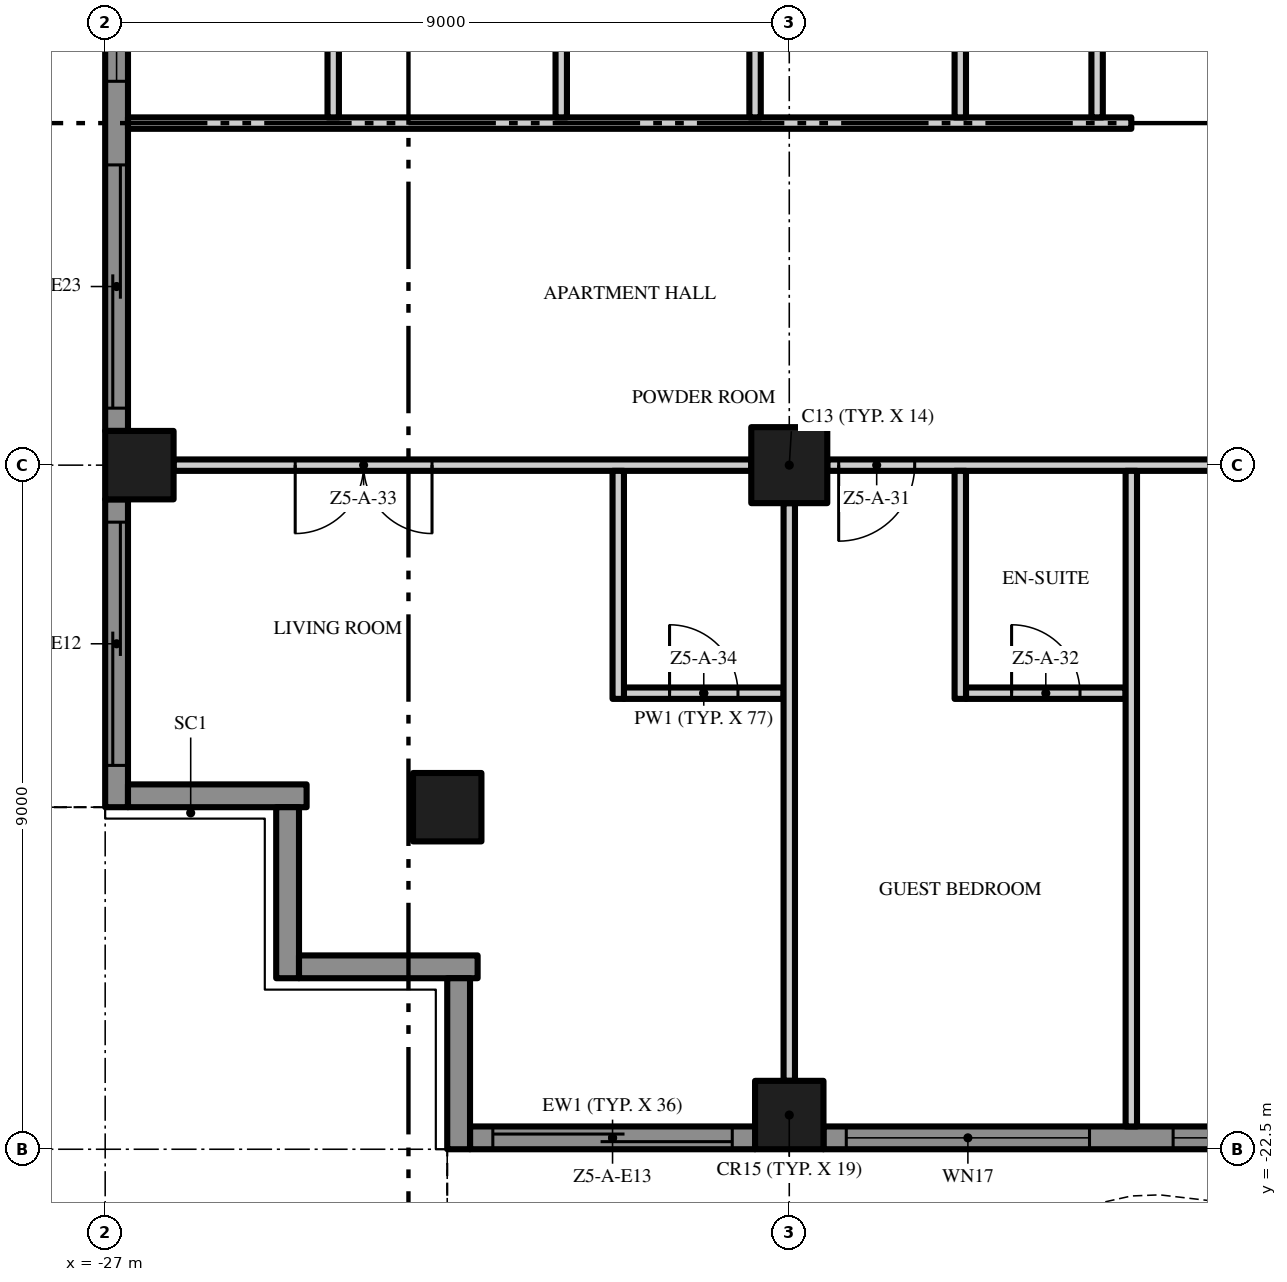
"""IFC4 building model, lengths in metres.
Left out: names, types, materials, properties, quantities, classifications, styles, units other than length and angle.
Written with IfcOpenShell. Run it as: python <this file> out.ifc"""

import sys

from ifc_helpers import new_model, si_unit, direction, frame, frame_2d, origin, origin_2d, place, context, subcontext, project, spatial, polyline, rectangle, outline, extrude, element, fill, save


model = new_model("IFC4")
c1 = context("Model", 3, precision=1e-05, world=origin(), true_north=direction((0.0, 1.0)))
c2 = subcontext(c1, "Body", "Model", "MODEL_VIEW")
j1 = project(units=[si_unit("LENGTHUNIT", "METRE"), si_unit("PLANEANGLEUNIT", "RADIAN")], contexts=[c1])
p1 = place(None, origin())
s1 = spatial("IfcSite", under=j1, at=p1, CompositionType="ELEMENT")
p2 = place(p1, origin())
s2 = spatial("IfcBuilding", under=s1, at=p2, CompositionType="ELEMENT")
p3 = place(p2, frame((0.0, 0.0, 246.4)))
s3 = spatial("IfcBuildingStorey", under=s2, at=p3, CompositionType="ELEMENT", Elevation=246.4)
p4 = place(p3, frame((-18.0, -13.5, 0.0), z_axis=(0.0, 0.0, 1.0), x_axis=(1.0, 0.0, 0.0)))
e1 = element("IfcColumn", 1, at=p4, inside=s3, PredefinedType="COLUMN", context=c2, shape_type="SweptSolid", body=[
    extrude(rectangle(XDim=1.0, YDim=1.0, at=origin_2d()), origin(), (0.0, 0.0, 1.0), 3.5),
])
for number, where, z_axis, x_axis in (
    (2, (-18.0, -22.05, 0.0), (0.0, 0.0, 1.0), (1.0, 0.0, 0.0)),
    (3, (-26.55, -13.5, 0.0), (0.0, 0.0, 1.0), (1.0, 0.0, 0.0)),
    (4, (-22.5, -18.0, 0.0), (0.0, 0.0, 1.0), (1.0, 0.0, 0.0)),
):
    element("IfcColumn", number, at=place(p3, frame(where, z_axis=z_axis, x_axis=x_axis)), inside=s3, PredefinedType="COLUMN", context=c2, shape_type="SweptSolid", body=[
        extrude(rectangle(XDim=0.9, YDim=0.9, at=origin_2d()), origin(), (0.0, 0.0, 1.0), 3.5),
    ])
p5 = place(p3, frame((-18.45, -22.35, 0.0), z_axis=(0.0, 0.0, 1.0), x_axis=(-1.0, 0.0, 0.0)))
e5 = element("IfcWall", 5, at=p5, inside=s3, PredefinedType="SOLIDWALL", context=c2, shape_type="SweptSolid", body=[
    extrude(rectangle(XDim=3.75, YDim=0.3, at=frame_2d((1.875, 0.0))), origin(), (0.0, 0.0, 1.0), 3.5),
])
p6 = place(p5, frame((0.3, 0.0, 0.0)))
e6 = element("IfcOpeningElement", 6, at=p6, cuts=e5, PredefinedType="OPENING", context=c2, shape_type="SweptSolid", body=[
    extrude(rectangle(XDim=3.15, YDim=2.4, at=frame_2d((1.575, 1.2))), frame((0.0, 0.16, 0.0), z_axis=(0.0, -1.0, 0.0), x_axis=(1.0, 0.0, 0.0)), (0.0, 0.0, 1.0), 0.32),
])
p7 = place(p3, frame((-9.45, -22.35, 0.0), z_axis=(0.0, 0.0, 1.0), x_axis=(-1.0, 0.0, 0.0)))
e7 = element("IfcWall", 7, at=p7, inside=s3, PredefinedType="SOLIDWALL", context=c2, shape_type="SweptSolid", body=[
    extrude(rectangle(XDim=8.1, YDim=0.3, at=frame_2d((4.05, 0.0))), origin(), (0.0, 0.0, 1.0), 3.5),
])
p8 = place(p7, frame((4.6, 0.0, 0.45)))
e8 = element("IfcOpeningElement", 8, at=p8, cuts=e7, PredefinedType="OPENING", context=c2, shape_type="SweptSolid", body=[
    extrude(rectangle(XDim=3.2, YDim=2.65, at=frame_2d((1.6, 1.325))), frame((0.0, 0.16, 0.0), z_axis=(0.0, -1.0, 0.0), x_axis=(1.0, 0.0, 0.0)), (0.0, 0.0, 1.0), 0.32),
])
p9 = place(p7, frame((0.3, 0.0, 0.45)))
e9 = element("IfcOpeningElement", 9, at=p9, cuts=e7, PredefinedType="OPENING", context=c2, shape_type="SweptSolid", body=[
    extrude(rectangle(XDim=3.2, YDim=2.65, at=frame_2d((1.6, 1.325))), frame((0.0, 0.16, 0.0), z_axis=(0.0, -1.0, 0.0), x_axis=(1.0, 0.0, 0.0)), (0.0, 0.0, 1.0), 0.32),
])
p10 = place(p3, frame((-26.85, -13.05, 0.0), z_axis=(0.0, 0.0, 1.0), x_axis=(0.0, 1.0, 0.0)))
e10 = element("IfcWall", 10, at=p10, inside=s3, PredefinedType="SOLIDWALL", context=c2, shape_type="SweptSolid", body=[
    extrude(rectangle(XDim=8.1, YDim=0.3, at=frame_2d((4.05, 0.0))), origin(), (0.0, 0.0, 1.0), 3.5),
])
p11 = place(p10, frame((4.6, 0.0, 0.45)))
e11 = element("IfcOpeningElement", 11, at=p11, cuts=e10, PredefinedType="OPENING", context=c2, shape_type="SweptSolid", body=[
    extrude(rectangle(XDim=3.2, YDim=2.65, at=frame_2d((1.6, 1.325))), frame((0.0, 0.16, 0.0), z_axis=(0.0, -1.0, 0.0), x_axis=(1.0, 0.0, 0.0)), (0.0, 0.0, 1.0), 0.32),
])
p12 = place(p10, frame((0.3, 0.0, 0.0)))
e12 = element("IfcOpeningElement", 12, at=p12, cuts=e10, PredefinedType="OPENING", context=c2, shape_type="SweptSolid", body=[
    extrude(rectangle(XDim=3.2, YDim=2.4, at=frame_2d((1.6, 1.2))), frame((0.0, 0.16, 0.0), z_axis=(0.0, -1.0, 0.0), x_axis=(1.0, 0.0, 0.0)), (0.0, 0.0, 1.0), 0.32),
])
p13 = place(p3, frame((-26.85, -18.0, 0.0), z_axis=(0.0, 0.0, 1.0), x_axis=(0.0, 1.0, 0.0)))
e13 = element("IfcWall", 13, at=p13, inside=s3, PredefinedType="SOLIDWALL", context=c2, shape_type="SweptSolid", body=[
    extrude(rectangle(XDim=4.05, YDim=0.3, at=frame_2d((2.025, 0.0))), origin(), (0.0, 0.0, 1.0), 3.5),
])
p14 = place(p13, frame((0.55, 0.0, 0.0)))
e14 = element("IfcOpeningElement", 14, at=p14, cuts=e13, PredefinedType="OPENING", context=c2, shape_type="SweptSolid", body=[
    extrude(rectangle(XDim=3.2, YDim=2.4, at=frame_2d((1.6, 1.2))), frame((0.0, 0.16, 0.0), z_axis=(0.0, -1.0, 0.0), x_axis=(1.0, 0.0, 0.0)), (0.0, 0.0, 1.0), 0.32),
])
p15 = place(p3, frame((-24.35, -17.85, 0.0), z_axis=(0.0, 0.0, 1.0), x_axis=(-1.0, 0.0, 0.0)))
e15 = element("IfcWall", 15, at=p15, inside=s3, PredefinedType="SOLIDWALL", context=c2, shape_type="SweptSolid", body=[
    extrude(rectangle(XDim=2.35, YDim=0.3, at=frame_2d((1.175, 0.0))), origin(), (0.0, 0.0, 1.0), 3.5),
])
p16 = place(p3, frame((-24.6, -20.25, 0.0), z_axis=(0.0, 0.0, 1.0), x_axis=(0.0, 1.0, 0.0)))
e16 = element("IfcWall", 16, at=p16, inside=s3, PredefinedType="SOLIDWALL", context=c2, shape_type="SweptSolid", body=[
    extrude(rectangle(XDim=2.25, YDim=0.3, at=frame_2d((1.125, 0.0))), origin(), (0.0, 0.0, 1.0), 3.5),
])
p17 = place(p3, frame((-22.1, -20.1, 0.0), z_axis=(0.0, 0.0, 1.0), x_axis=(-1.0, 0.0, 0.0)))
e17 = element("IfcWall", 17, at=p17, inside=s3, PredefinedType="SOLIDWALL", context=c2, shape_type="SweptSolid", body=[
    extrude(rectangle(XDim=2.35, YDim=0.3, at=frame_2d((1.175, 0.0))), origin(), (0.0, 0.0, 1.0), 3.5),
])
p18 = place(p3, frame((-22.35, -22.5, 0.0), z_axis=(0.0, 0.0, 1.0), x_axis=(0.0, 1.0, 0.0)))
e18 = element("IfcWall", 18, at=p18, inside=s3, PredefinedType="SOLIDWALL", context=c2, shape_type="SweptSolid", body=[
    extrude(rectangle(XDim=2.25, YDim=0.3, at=frame_2d((1.125, 0.0))), origin(), (0.0, 0.0, 1.0), 3.5),
])
p19 = place(p3, origin())
e19 = element("IfcWall", 19, at=p19, inside=s3, PredefinedType="USERDEFINED", context=c2, shape_type="SweptSolid", body=[
    extrude(outline(polyline([(-22.5, -25.149), (-21.0, -25.485), (-20.625, -25.5), (-19.5, -25.369), (-18.0, -24.845), (-16.5, -24.112), (-15.0, -23.451), (-13.5, -23.115), (-13.125, -23.1), (-12.0, -23.231), (-10.5, -23.755), (-9.0, -24.488), (-7.5, -25.149), (-6.0, -25.485), (-5.625, -25.5), (-4.5, -25.369), (-3.0, -24.845), (-1.5, -24.112), (0.0, -23.451), (1.5, -23.115), (1.875, -23.1), (3.0, -23.231), (4.5, -23.755), (6.0, -24.488), (7.5, -25.149), (9.0, -25.485), (9.375, -25.5), (10.5, -25.369), (12.0, -24.845), (13.5, -24.112), (15.0, -23.451), (16.5, -23.115), (16.875, -23.1), (18.0, -23.231), (19.5, -23.755), (21.0, -24.488), (22.5, -25.149), (22.601, -24.92), (21.105, -24.261), (19.596, -23.524), (18.056, -22.986), (16.885, -22.849), (16.467, -22.866), (14.921, -23.213), (13.395, -23.885), (11.904, -24.614), (10.444, -25.124), (9.365, -25.249), (9.033, -25.236), (7.579, -24.91), (6.105, -24.261), (4.596, -23.524), (3.056, -22.986), (1.885, -22.849), (1.467, -22.866), (-0.079, -23.213), (-1.605, -23.885), (-3.096, -24.614), (-4.556, -25.124), (-5.635, -25.249), (-5.967, -25.236), (-7.421, -24.91), (-8.895, -24.261), (-10.404, -23.524), (-11.944, -22.986), (-13.115, -22.849), (-13.533, -22.866), (-15.079, -23.213), (-16.605, -23.885), (-18.096, -24.614), (-19.556, -25.124), (-20.635, -25.249), (-20.967, -25.236), (-22.445, -24.905), (-22.5, -25.149)])), origin(), (0.0, 0.0, 1.0), 0.9),
])
p20 = place(p3, origin())
e20 = element("IfcWall", 20, at=p20, inside=s3, PredefinedType="USERDEFINED", context=c2, shape_type="SweptSolid", body=[
    extrude(outline(polyline([(-29.649, 18.0), (-29.985, 16.5), (-30.0, 16.125), (-29.869, 15.0), (-29.345, 13.5), (-28.612, 12.0), (-27.951, 10.5), (-27.615, 9.0), (-27.6, 8.625), (-27.731, 7.5), (-28.255, 6.0), (-28.988, 4.5), (-29.649, 3.0), (-29.985, 1.5), (-30.0, 1.125), (-29.869, 0.0), (-29.345, -1.5), (-28.612, -3.0), (-27.951, -4.5), (-27.615, -6.0), (-27.6, -6.375), (-27.731, -7.5), (-28.255, -9.0), (-28.988, -10.5), (-29.649, -12.0), (-29.985, -13.5), (-30.0, -13.875), (-29.869, -15.0), (-29.345, -16.5), (-28.612, -18.0), (-28.388, -17.89), (-29.114, -16.404), (-29.624, -14.944), (-29.749, -13.865), (-29.736, -13.533), (-29.41, -12.079), (-28.761, -10.605), (-28.024, -9.096), (-27.486, -7.556), (-27.349, -6.385), (-27.366, -5.967), (-27.713, -4.421), (-28.385, -2.895), (-29.114, -1.404), (-29.624, 0.056), (-29.749, 1.135), (-29.736, 1.467), (-29.41, 2.921), (-28.761, 4.395), (-28.024, 5.904), (-27.486, 7.444), (-27.349, 8.615), (-27.366, 9.033), (-27.713, 10.579), (-28.385, 12.105), (-29.114, 13.596), (-29.624, 15.056), (-29.749, 16.135), (-29.736, 16.467), (-29.405, 17.945), (-29.649, 18.0)])), origin(), (0.0, 0.0, 1.0), 0.9),
])
p21 = place(p3, frame((-20.175, -16.5, 0.0), z_axis=(0.0, 0.0, 1.0), x_axis=(1.0, 0.0, 0.0)))
e21 = element("IfcWall", 21, at=p21, inside=s3, PredefinedType="PARTITIONING", context=c2, shape_type="SweptSolid", body=[
    extrude(rectangle(XDim=2.1, YDim=0.15, at=frame_2d((1.05, 0.0))), origin(), (0.0, 0.0, 1.0), 3.5),
])
p22 = place(p21, frame((0.6, 0.0, 0.0)))
e22 = element("IfcOpeningElement", 22, at=p22, cuts=e21, PredefinedType="OPENING", context=c2, shape_type="SweptSolid", body=[
    extrude(rectangle(XDim=0.9, YDim=2.1, at=frame_2d((0.45, 1.05))), frame((0.0, 0.085, 0.0), z_axis=(0.0, -1.0, 0.0), x_axis=(1.0, 0.0, 0.0)), (0.0, 0.0, 1.0), 0.17),
])
p23 = place(p3, frame((-15.675, -16.5, 0.0), z_axis=(0.0, 0.0, 1.0), x_axis=(1.0, 0.0, 0.0)))
e23 = element("IfcWall", 23, at=p23, inside=s3, PredefinedType="PARTITIONING", context=c2, shape_type="SweptSolid", body=[
    extrude(rectangle(XDim=2.1, YDim=0.15, at=frame_2d((1.05, 0.0))), origin(), (0.0, 0.0, 1.0), 3.5),
])
p24 = place(p23, frame((0.6, 0.0, 0.0)))
e24 = element("IfcOpeningElement", 24, at=p24, cuts=e23, PredefinedType="OPENING", context=c2, shape_type="SweptSolid", body=[
    extrude(rectangle(XDim=0.9, YDim=2.1, at=frame_2d((0.45, 1.05))), frame((0.0, 0.085, 0.0), z_axis=(0.0, -1.0, 0.0), x_axis=(1.0, 0.0, 0.0)), (0.0, 0.0, 1.0), 0.17),
])
p25 = place(p3, frame((-18.5, -13.5, 0.0), z_axis=(0.0, 0.0, 1.0), x_axis=(-1.0, 0.0, 0.0)))
e25 = element("IfcWall", 25, at=p25, inside=s3, PredefinedType="PARTITIONING", context=c2, shape_type="SweptSolid", body=[
    extrude(rectangle(XDim=7.6, YDim=0.15, at=frame_2d((3.8, 0.0))), origin(), (0.0, 0.0, 1.0), 3.5),
])
p26 = place(p25, frame((4.2, 0.0, 0.0)))
e26 = element("IfcOpeningElement", 26, at=p26, cuts=e25, PredefinedType="OPENING", context=c2, shape_type="SweptSolid", body=[
    extrude(rectangle(XDim=1.8, YDim=2.4, at=frame_2d((0.9, 1.2))), frame((0.0, 0.085, 0.0), z_axis=(0.0, -1.0, 0.0), x_axis=(1.0, 0.0, 0.0)), (0.0, 0.0, 1.0), 0.17),
])
p27 = place(p3, frame((-9.5, -13.5, 0.0), z_axis=(0.0, 0.0, 1.0), x_axis=(-1.0, 0.0, 0.0)))
e27 = element("IfcWall", 27, at=p27, inside=s3, PredefinedType="PARTITIONING", context=c2, shape_type="SweptSolid", body=[
    extrude(rectangle(XDim=8.0, YDim=0.15, at=frame_2d((4.0, 0.0))), origin(), (0.0, 0.0, 1.0), 3.5),
])
p28 = place(p27, frame((1.25, 0.0, 0.0)))
e28 = element("IfcOpeningElement", 28, at=p28, cuts=e27, PredefinedType="OPENING", context=c2, shape_type="SweptSolid", body=[
    extrude(rectangle(XDim=1.0, YDim=2.4, at=frame_2d((0.5, 1.2))), frame((0.0, 0.085, 0.0), z_axis=(0.0, -1.0, 0.0), x_axis=(1.0, 0.0, 0.0)), (0.0, 0.0, 1.0), 0.17),
])
p29 = place(p27, frame((6.85, 0.0, 0.0)))
e29 = element("IfcOpeningElement", 29, at=p29, cuts=e27, PredefinedType="OPENING", context=c2, shape_type="SweptSolid", body=[
    extrude(rectangle(XDim=1.0, YDim=2.4, at=frame_2d((0.5, 1.2))), frame((0.0, 0.085, 0.0), z_axis=(0.0, -1.0, 0.0), x_axis=(1.0, 0.0, 0.0)), (0.0, 0.0, 1.0), 0.17),
])
p30 = place(p3, frame((-26.7, -9.0, 0.0), z_axis=(0.0, 0.0, 1.0), x_axis=(1.0, 0.0, 0.0)))
e30 = element("IfcWall", 30, at=p30, inside=s3, PredefinedType="PARTITIONING", context=c2, shape_type="SweptSolid", body=[
    extrude(rectangle(XDim=13.2, YDim=0.15, at=frame_2d((6.6, 0.0))), origin(), (0.0, 0.0, 1.0), 3.5),
])
for number, where, z_axis, x_axis in (
    (31, (-24.0, -8.925, 0.0), (0.0, 0.0, 1.0), (0.0, 1.0, 0.0)),
    (32, (-21.0, -8.925, 0.0), (0.0, 0.0, 1.0), (0.0, 1.0, 0.0)),
):
    element("IfcWall", number, at=place(p3, frame(where, z_axis=z_axis, x_axis=x_axis)), inside=s3, PredefinedType="PARTITIONING", context=c2, shape_type="SweptSolid", body=[
        extrude(rectangle(XDim=4.35, YDim=0.15, at=frame_2d((2.175, 0.0))), origin(), (0.0, 0.0, 1.0), 3.5),
    ])
p31 = place(p3, frame((-20.25, -16.575, 0.0), z_axis=(0.0, 0.0, 1.0), x_axis=(0.0, 1.0, 0.0)))
e33 = element("IfcWall", 33, at=p31, inside=s3, PredefinedType="PARTITIONING", context=c2, shape_type="SweptSolid", body=[
    extrude(rectangle(XDim=3.0, YDim=0.15, at=frame_2d((1.5, 0.0))), origin(), (0.0, 0.0, 1.0), 3.5),
])
p32 = place(p3, frame((-18.45, -8.925, 0.0), z_axis=(0.0, 0.0, 1.0), x_axis=(0.0, 1.0, 0.0)))
e34 = element("IfcWall", 34, at=p32, inside=s3, PredefinedType="PARTITIONING", context=c2, shape_type="SweptSolid", body=[
    extrude(rectangle(XDim=3.925, YDim=0.15, at=frame_2d((1.962, 0.0))), origin(), (0.0, 0.0, 1.0), 3.5),
])
p33 = place(p3, frame((-18.0, -21.6, 0.0), z_axis=(0.0, 0.0, 1.0), x_axis=(0.0, 1.0, 0.0)))
e35 = element("IfcWall", 35, at=p33, inside=s3, PredefinedType="PARTITIONING", context=c2, shape_type="SweptSolid", body=[
    extrude(rectangle(XDim=7.6, YDim=0.15, at=frame_2d((3.8, 0.0))), origin(), (0.0, 0.0, 1.0), 3.5),
])
p34 = place(p3, frame((-15.75, -16.575, 0.0), z_axis=(0.0, 0.0, 1.0), x_axis=(0.0, 1.0, 0.0)))
e36 = element("IfcWall", 36, at=p34, inside=s3, PredefinedType="PARTITIONING", context=c2, shape_type="SweptSolid", body=[
    extrude(rectangle(XDim=3.0, YDim=0.15, at=frame_2d((1.5, 0.0))), origin(), (0.0, 0.0, 1.0), 3.5),
])
p35 = place(p3, frame((-15.75, -8.925, 0.0), z_axis=(0.0, 0.0, 1.0), x_axis=(0.0, 1.0, 0.0)))
e37 = element("IfcWall", 37, at=p35, inside=s3, PredefinedType="PARTITIONING", context=c2, shape_type="SweptSolid", body=[
    extrude(rectangle(XDim=4.35, YDim=0.15, at=frame_2d((2.175, 0.0))), origin(), (0.0, 0.0, 1.0), 3.5),
])
p36 = place(p3, frame((-13.95, -8.925, 0.0), z_axis=(0.0, 0.0, 1.0), x_axis=(0.0, 1.0, 0.0)))
e38 = element("IfcWall", 38, at=p36, inside=s3, PredefinedType="PARTITIONING", context=c2, shape_type="SweptSolid", body=[
    extrude(rectangle(XDim=4.5, YDim=0.15, at=frame_2d((2.25, 0.0))), origin(), (0.0, 0.0, 1.0), 3.5),
])
p37 = place(p3, frame((-13.5, -22.2, 0.0), z_axis=(0.0, 0.0, 1.0), x_axis=(0.0, 1.0, 0.0)))
e39 = element("IfcWall", 39, at=p37, inside=s3, PredefinedType="PARTITIONING", context=c2, shape_type="SweptSolid", body=[
    extrude(rectangle(XDim=8.625, YDim=0.15, at=frame_2d((4.312, 0.0))), origin(), (0.0, 0.0, 1.0), 3.5),
])
p38 = place(p6, origin())
e40 = element("IfcDoor", 40, at=p38, inside=s3, OperationType="SINGLE_SWING_LEFT", PredefinedType="DOOR", context=c2, shape_type="SweptSolid", body=[
    extrude(rectangle(XDim=3.15, YDim=2.4, at=frame_2d((1.575, 1.2))), frame((0.0, 0.025, 0.0), z_axis=(0.0, -1.0, 0.0), x_axis=(1.0, 0.0, 0.0)), (0.0, 0.0, 1.0), 0.05),
])
fill(e6, e40)
p39 = place(p8, origin())
e41 = element("IfcWindow", 41, at=p39, inside=s3, PartitioningType="SINGLE_PANEL", PredefinedType="WINDOW", context=c2, shape_type="SweptSolid", body=[
    extrude(rectangle(XDim=3.2, YDim=2.65, at=frame_2d((1.6, 1.325))), frame((0.0, 0.03, 0.0), z_axis=(0.0, -1.0, 0.0), x_axis=(1.0, 0.0, 0.0)), (0.0, 0.0, 1.0), 0.06),
])
fill(e8, e41)
p40 = place(p9, origin())
e42 = element("IfcWindow", 42, at=p40, inside=s3, PartitioningType="SINGLE_PANEL", PredefinedType="WINDOW", context=c2, shape_type="SweptSolid", body=[
    extrude(rectangle(XDim=3.2, YDim=2.65, at=frame_2d((1.6, 1.325))), frame((0.0, 0.03, 0.0), z_axis=(0.0, -1.0, 0.0), x_axis=(1.0, 0.0, 0.0)), (0.0, 0.0, 1.0), 0.06),
])
fill(e9, e42)
p41 = place(p11, origin())
e43 = element("IfcWindow", 43, at=p41, inside=s3, PartitioningType="SINGLE_PANEL", PredefinedType="WINDOW", context=c2, shape_type="SweptSolid", body=[
    extrude(rectangle(XDim=3.2, YDim=2.65, at=frame_2d((1.6, 1.325))), frame((0.0, 0.03, 0.0), z_axis=(0.0, -1.0, 0.0), x_axis=(1.0, 0.0, 0.0)), (0.0, 0.0, 1.0), 0.06),
])
fill(e11, e43)
p42 = place(p12, origin())
e44 = element("IfcDoor", 44, at=p42, inside=s3, OperationType="SINGLE_SWING_LEFT", PredefinedType="DOOR", context=c2, shape_type="SweptSolid", body=[
    extrude(rectangle(XDim=3.2, YDim=2.4, at=frame_2d((1.6, 1.2))), frame((0.0, 0.025, 0.0), z_axis=(0.0, -1.0, 0.0), x_axis=(1.0, 0.0, 0.0)), (0.0, 0.0, 1.0), 0.05),
])
fill(e12, e44)
p43 = place(p14, origin())
e45 = element("IfcDoor", 45, at=p43, inside=s3, OperationType="SINGLE_SWING_LEFT", PredefinedType="DOOR", context=c2, shape_type="SweptSolid", body=[
    extrude(rectangle(XDim=3.2, YDim=2.4, at=frame_2d((1.6, 1.2))), frame((0.0, 0.025, 0.0), z_axis=(0.0, -1.0, 0.0), x_axis=(1.0, 0.0, 0.0)), (0.0, 0.0, 1.0), 0.05),
])
fill(e14, e45)
p44 = place(p29, origin())
e46 = element("IfcDoor", 46, at=p44, inside=s3, OperationType="SINGLE_SWING_RIGHT", PredefinedType="DOOR", context=c2, shape_type="SweptSolid", body=[
    extrude(rectangle(XDim=1.0, YDim=2.4, at=frame_2d((0.5, 1.2))), frame((0.0, 0.025, 0.0), z_axis=(0.0, -1.0, 0.0), x_axis=(1.0, 0.0, 0.0)), (0.0, 0.0, 1.0), 0.05),
])
fill(e29, e46)
p45 = place(p24, origin())
e47 = element("IfcDoor", 47, at=p45, inside=s3, OperationType="SINGLE_SWING_LEFT", PredefinedType="DOOR", context=c2, shape_type="SweptSolid", body=[
    extrude(rectangle(XDim=0.9, YDim=2.1, at=frame_2d((0.45, 1.05))), frame((0.0, 0.025, 0.0), z_axis=(0.0, -1.0, 0.0), x_axis=(1.0, 0.0, 0.0)), (0.0, 0.0, 1.0), 0.05),
])
fill(e24, e47)
p46 = place(p26, origin())
e48 = element("IfcDoor", 48, at=p46, inside=s3, OperationType="DOUBLE_DOOR_SINGLE_SWING", PredefinedType="DOOR", context=c2, shape_type="SweptSolid", body=[
    extrude(rectangle(XDim=1.8, YDim=2.4, at=frame_2d((0.9, 1.2))), frame((0.0, 0.025, 0.0), z_axis=(0.0, -1.0, 0.0), x_axis=(1.0, 0.0, 0.0)), (0.0, 0.0, 1.0), 0.05),
])
fill(e26, e48)
p47 = place(p22, origin())
e49 = element("IfcDoor", 49, at=p47, inside=s3, OperationType="SINGLE_SWING_LEFT", PredefinedType="DOOR", context=c2, shape_type="SweptSolid", body=[
    extrude(rectangle(XDim=0.9, YDim=2.1, at=frame_2d((0.45, 1.05))), frame((0.0, 0.025, 0.0), z_axis=(0.0, -1.0, 0.0), x_axis=(1.0, 0.0, 0.0)), (0.0, 0.0, 1.0), 0.05),
])
fill(e22, e49)
save(model, sys.argv[1])
